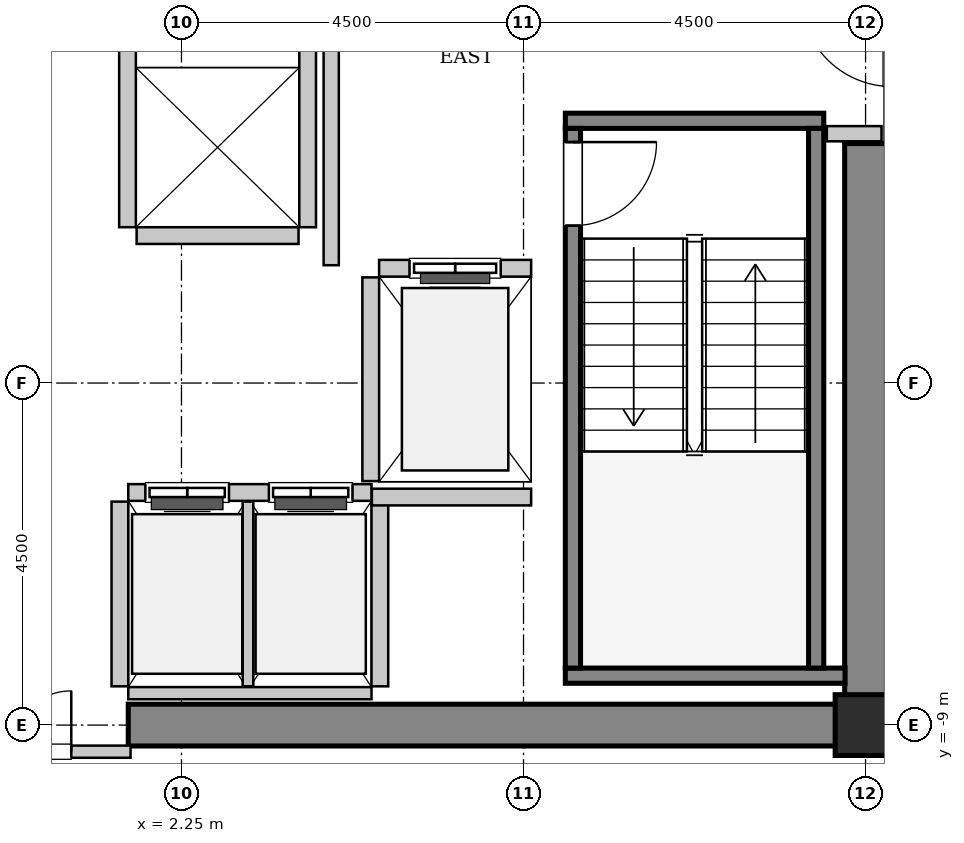
"""IFC4 building model, lengths in metres.
Left out: names, types, materials, properties, quantities, classifications, styles, units other than length and angle.
Written with IfcOpenShell. Run it as: python <this file> out.ifc"""

import sys

from ifc_helpers import new_model, si_unit, direction, frame, frame_2d, origin, origin_2d, place, context, subcontext, project, spatial, rectangle, hollow_rectangle, extrude, source, transform, mapped, element, fill, save


model = new_model("IFC4")
c1 = context("Model", 3, precision=1e-05, world=origin(), true_north=direction((0.0, 1.0)))
c2 = subcontext(c1, "Body", "Model", "MODEL_VIEW")
j1 = project(units=[si_unit("LENGTHUNIT", "METRE"), si_unit("PLANEANGLEUNIT", "RADIAN")], contexts=[c1])
p1 = place(None, origin())
s1 = spatial("IfcSite", under=j1, at=p1, CompositionType="ELEMENT")
p2 = place(p1, origin())
s2 = spatial("IfcBuilding", under=s1, at=p2, CompositionType="ELEMENT")
p3 = place(p2, frame((0.0, 0.0, 186.8)))
s3 = spatial("IfcBuildingStorey", under=s2, at=p3, CompositionType="ELEMENT", Elevation=186.8)
m1 = source(origin(), c2, "Body", "SweptSolid", [
    extrude(rectangle(XDim=9.975, YDim=0.55, at=frame_2d((4.987, 0.0))), origin(), (0.0, 0.0, 1.0), 3.8),
])
p4 = place(p3, frame((1.55, -9.0, 0.0), z_axis=(0.0, 0.0, 1.0), x_axis=(1.0, 0.0, 0.0)))
e1 = element("IfcWall", 1, at=p4, inside=s3, PredefinedType="SHEAR", context=c2, shape_type="MappedRepresentation", body=[
    mapped(m1, transform((0.0, 0.0, 0.0), x_axis=(1.0, 0.0, 0.0), y_axis=(0.0, 1.0, 0.0), z_axis=(0.0, 0.0, 1.0), scale=1.0)),
])
m2 = source(origin(), c2, "Body", "SweptSolid", [
    extrude(rectangle(XDim=7.375, YDim=0.55, at=frame_2d((3.688, 0.0))), origin(), (0.0, 0.0, 1.0), 3.8),
])
p5 = place(p3, frame((11.25, -8.725, 0.0), z_axis=(0.0, 0.0, 1.0), x_axis=(0.0, 1.0, 0.0)))
e2 = element("IfcWall", 2, at=p5, inside=s3, PredefinedType="SHEAR", context=c2, shape_type="MappedRepresentation", body=[
    mapped(m2, transform((0.0, 0.0, 0.0), x_axis=(1.0, 0.0, 0.0), y_axis=(0.0, 1.0, 0.0), z_axis=(0.0, 0.0, 1.0), scale=1.0)),
])
m3 = source(origin(), c2, "Body", "SweptSolid", [
    extrude(hollow_rectangle(XDim=0.8, YDim=0.8, WallThickness=0.04, InnerFilletRadius=0.04, OuterFilletRadius=0.08, at=origin_2d()), origin(), (0.0, 0.0, 1.0), 3.8),
])
p6 = place(p3, frame((11.25, -9.0, 0.0), z_axis=(0.0, 0.0, 1.0), x_axis=(1.0, 0.0, 0.0)))
e3 = element("IfcColumn", 3, at=p6, inside=s3, PredefinedType="COLUMN", context=c2, shape_type="MappedRepresentation", body=[
    mapped(m3, transform((0.0, 0.0, 0.0), x_axis=(1.0, 0.0, 0.0), y_axis=(0.0, 1.0, 0.0), z_axis=(0.0, 0.0, 1.0), scale=1.0)),
])
m4 = source(origin(), c2, "Body", "SweptSolid", [
    extrude(rectangle(XDim=3.4, YDim=0.2, at=frame_2d((1.7, 0.0))), origin(), (0.0, 0.0, 1.0), 3.8),
])
p7 = place(p3, frame((7.3, -1.05, 0.0), z_axis=(0.0, 0.0, 1.0), x_axis=(1.0, 0.0, 0.0)))
e4 = element("IfcWall", 4, at=p7, inside=s3, PredefinedType="SOLIDWALL", context=c2, shape_type="MappedRepresentation", body=[
    mapped(m4, transform((0.0, 0.0, 0.0), x_axis=(1.0, 0.0, 0.0), y_axis=(0.0, 1.0, 0.0), z_axis=(0.0, 0.0, 1.0), scale=1.0)),
])
m5 = source(origin(), c2, "Body", "SweptSolid", [
    extrude(rectangle(XDim=3.68, YDim=0.2, at=frame_2d((1.84, 0.0))), origin(), (0.0, 0.0, 1.0), 3.8),
])
p8 = place(p3, frame((7.3, -8.35, 0.0), z_axis=(0.0, 0.0, 1.0), x_axis=(1.0, 0.0, 0.0)))
e5 = element("IfcWall", 5, at=p8, inside=s3, PredefinedType="SOLIDWALL", context=c2, shape_type="MappedRepresentation", body=[
    mapped(m5, transform((0.0, 0.0, 0.0), x_axis=(1.0, 0.0, 0.0), y_axis=(0.0, 1.0, 0.0), z_axis=(0.0, 0.0, 1.0), scale=1.0)),
])
m6 = source(origin(), c2, "Body", "SweptSolid", [
    extrude(rectangle(XDim=7.1, YDim=0.2, at=frame_2d((3.55, 0.0))), origin(), (0.0, 0.0, 1.0), 3.8),
])
p9 = place(p3, frame((7.4, -1.15, 0.0), z_axis=(0.0, 0.0, 1.0), x_axis=(0.0, -1.0, 0.0)))
e6 = element("IfcWall", 6, at=p9, inside=s3, PredefinedType="SOLIDWALL", context=c2, shape_type="MappedRepresentation", body=[
    mapped(m6, transform((0.0, 0.0, 0.0), x_axis=(1.0, 0.0, 0.0), y_axis=(0.0, 1.0, 0.0), z_axis=(0.0, 0.0, 1.0), scale=1.0)),
])
p10 = place(p9, frame((0.18, 0.0, 0.0)))
e7 = element("IfcOpeningElement", 7, at=p10, cuts=e6, PredefinedType="OPENING", context=c2, shape_type="SweptSolid", body=[
    extrude(rectangle(XDim=1.1, YDim=2.15, at=frame_2d((0.55, 1.075))), frame((0.0, 0.11, 0.0), z_axis=(0.0, -1.0, 0.0), x_axis=(1.0, 0.0, 0.0)), (0.0, 0.0, 1.0), 0.22),
])
p11 = place(p3, frame((10.6, -1.15, 0.0), z_axis=(0.0, 0.0, 1.0), x_axis=(0.0, -1.0, 0.0)))
e8 = element("IfcWall", 8, at=p11, inside=s3, PredefinedType="SOLIDWALL", context=c2, shape_type="MappedRepresentation", body=[
    mapped(m6, transform((0.0, 0.0, 0.0), x_axis=(1.0, 0.0, 0.0), y_axis=(0.0, 1.0, 0.0), z_axis=(0.0, 0.0, 1.0), scale=1.0)),
])
m7 = source(origin(), c2, "Body", "SweptSolid", [
    extrude(rectangle(XDim=2.0, YDim=0.22, at=frame_2d((1.0, 0.0))), origin(), (0.0, 0.0, 1.0), 3.535),
])
p12 = place(p3, frame((6.85, -2.99, 0.0), z_axis=(0.0, 0.0, 1.0), x_axis=(-1.0, 0.0, 0.0)))
e9 = element("IfcWall", 9, at=p12, inside=s3, PredefinedType="SOLIDWALL", context=c2, shape_type="MappedRepresentation", body=[
    mapped(m7, transform((0.0, 0.0, 0.0), x_axis=(1.0, 0.0, 0.0), y_axis=(0.0, 1.0, 0.0), z_axis=(0.0, 0.0, 1.0), scale=1.0)),
])
p13 = place(p12, frame((0.4, 0.0, 0.0)))
e10 = element("IfcOpeningElement", 10, at=p13, cuts=e9, PredefinedType="OPENING", context=c2, shape_type="SweptSolid", body=[
    extrude(rectangle(XDim=1.2, YDim=2.2, at=frame_2d((0.6, 1.1))), frame((0.0, 0.12, 0.0), z_axis=(0.0, -1.0, 0.0), x_axis=(1.0, 0.0, 0.0)), (0.0, 0.0, 1.0), 0.24),
])
m8 = source(origin(), c2, "Body", "SweptSolid", [
    extrude(rectangle(XDim=2.68, YDim=0.22, at=frame_2d((1.34, 0.0))), origin(), (0.0, 0.0, 1.0), 3.535),
])
p14 = place(p3, frame((4.74, -3.11, 0.0), z_axis=(0.0, 0.0, 1.0), x_axis=(0.0, -1.0, 0.0)))
e11 = element("IfcWall", 11, at=p14, inside=s3, PredefinedType="SOLIDWALL", context=c2, shape_type="MappedRepresentation", body=[
    mapped(m8, transform((0.0, 0.0, 0.0), x_axis=(1.0, 0.0, 0.0), y_axis=(0.0, 1.0, 0.0), z_axis=(0.0, 0.0, 1.0), scale=1.0)),
])
m9 = source(origin(), c2, "Body", "SweptSolid", [
    extrude(rectangle(XDim=3.2, YDim=0.22, at=frame_2d((1.6, 0.0))), origin(), (0.0, 0.0, 1.0), 3.535),
])
p15 = place(p3, frame((4.75, -5.94, 0.0), z_axis=(0.0, 0.0, 1.0), x_axis=(-1.0, 0.0, 0.0)))
e12 = element("IfcWall", 12, at=p15, inside=s3, PredefinedType="SOLIDWALL", context=c2, shape_type="MappedRepresentation", body=[
    mapped(m9, transform((0.0, 0.0, 0.0), x_axis=(1.0, 0.0, 0.0), y_axis=(0.0, 1.0, 0.0), z_axis=(0.0, 0.0, 1.0), scale=1.0)),
])
p16 = place(p15, frame((1.875, 0.0, 0.0)))
e13 = element("IfcOpeningElement", 13, at=p16, cuts=e12, PredefinedType="OPENING", context=c2, shape_type="SweptSolid", body=[
    extrude(rectangle(XDim=1.1, YDim=2.2, at=frame_2d((0.55, 1.1))), frame((0.0, 0.12, 0.0), z_axis=(0.0, -1.0, 0.0), x_axis=(1.0, 0.0, 0.0)), (0.0, 0.0, 1.0), 0.24),
])
p17 = place(p15, frame((0.25, 0.0, 0.0)))
e14 = element("IfcOpeningElement", 14, at=p17, cuts=e12, PredefinedType="OPENING", context=c2, shape_type="SweptSolid", body=[
    extrude(rectangle(XDim=1.1, YDim=2.2, at=frame_2d((0.55, 1.1))), frame((0.0, 0.12, 0.0), z_axis=(0.0, -1.0, 0.0), x_axis=(1.0, 0.0, 0.0)), (0.0, 0.0, 1.0), 0.24),
])
m10 = source(origin(), c2, "Body", "SweptSolid", [
    extrude(rectangle(XDim=3.2, YDim=0.16, at=frame_2d((1.6, 0.0))), origin(), (0.0, 0.0, 1.0), 2.425),
])
p18 = place(p3, frame((1.55, -8.58, 0.0), z_axis=(0.0, 0.0, 1.0), x_axis=(1.0, 0.0, 0.0)))
e15 = element("IfcWall", 15, at=p18, inside=s3, PredefinedType="PARTITIONING", context=c2, shape_type="MappedRepresentation", body=[
    mapped(m10, transform((0.0, 0.0, 0.0), x_axis=(1.0, 0.0, 0.0), y_axis=(0.0, 1.0, 0.0), z_axis=(0.0, 0.0, 1.0), scale=1.0)),
])
m11 = source(origin(), c2, "Body", "SweptSolid", [
    extrude(rectangle(XDim=2.43, YDim=0.22, at=frame_2d((1.215, 0.0))), origin(), (0.0, 0.0, 1.0), 3.535),
])
p19 = place(p3, frame((1.44, -6.06, 0.0), z_axis=(0.0, 0.0, 1.0), x_axis=(0.0, -1.0, 0.0)))
e16 = element("IfcWall", 16, at=p19, inside=s3, PredefinedType="SOLIDWALL", context=c2, shape_type="MappedRepresentation", body=[
    mapped(m11, transform((0.0, 0.0, 0.0), x_axis=(1.0, 0.0, 0.0), y_axis=(0.0, 1.0, 0.0), z_axis=(0.0, 0.0, 1.0), scale=1.0)),
])
m12 = source(origin(), c2, "Body", "SweptSolid", [
    extrude(rectangle(XDim=2.43, YDim=0.14, at=frame_2d((1.215, 0.0))), origin(), (0.0, 0.0, 1.0), 3.535),
])
p20 = place(p3, frame((3.125, -8.49, 0.0), z_axis=(0.0, 0.0, 1.0), x_axis=(0.0, 1.0, 0.0)))
e17 = element("IfcWall", 17, at=p20, inside=s3, PredefinedType="PARTITIONING", context=c2, shape_type="MappedRepresentation", body=[
    mapped(m12, transform((0.0, 0.0, 0.0), x_axis=(1.0, 0.0, 0.0), y_axis=(0.0, 1.0, 0.0), z_axis=(0.0, 0.0, 1.0), scale=1.0)),
])
p21 = place(p3, frame((4.86, -8.49, 0.0), z_axis=(0.0, 0.0, 1.0), x_axis=(0.0, 1.0, 0.0)))
e18 = element("IfcWall", 18, at=p21, inside=s3, PredefinedType="SOLIDWALL", context=c2, shape_type="MappedRepresentation", body=[
    mapped(m11, transform((0.0, 0.0, 0.0), x_axis=(1.0, 0.0, 0.0), y_axis=(0.0, 1.0, 0.0), z_axis=(0.0, 0.0, 1.0), scale=1.0)),
])
m13 = source(origin(), c2, "Body", "SweptSolid", [
    extrude(rectangle(XDim=4.9, YDim=0.22, at=frame_2d((2.45, 0.0))), origin(), (0.0, 0.0, 1.0), 3.535),
])
for number, where, z_axis, x_axis in (
    (19, (1.54, 2.45, 0.0), (0.0, 0.0, 1.0), (0.0, -1.0, 0.0)),
    (20, (3.91, -2.45, 0.0), (0.0, 0.0, 1.0), (0.0, 1.0, 0.0)),
):
    element("IfcWall", number, at=place(p3, frame(where, z_axis=z_axis, x_axis=x_axis)), inside=s3, PredefinedType="SOLIDWALL", context=c2, shape_type="MappedRepresentation", body=[
        mapped(m13, transform((0.0, 0.0, 0.0), x_axis=(1.0, 0.0, 0.0), y_axis=(0.0, 1.0, 0.0), z_axis=(0.0, 0.0, 1.0), scale=1.0)),
    ])
m14 = source(origin(), c2, "Body", "SweptSolid", [
    extrude(rectangle(XDim=2.13, YDim=0.22, at=frame_2d((1.065, 0.0))), origin(), (0.0, 0.0, 1.0), 3.535),
])
p22 = place(p3, frame((1.66, -2.56, 0.0), z_axis=(0.0, 0.0, 1.0), x_axis=(1.0, 0.0, 0.0)))
e21 = element("IfcWall", 21, at=p22, inside=s3, PredefinedType="SOLIDWALL", context=c2, shape_type="MappedRepresentation", body=[
    mapped(m14, transform((0.0, 0.0, 0.0), x_axis=(1.0, 0.0, 0.0), y_axis=(0.0, 1.0, 0.0), z_axis=(0.0, 0.0, 1.0), scale=1.0)),
])
m15 = source(origin(), c2, "Body", "SweptSolid", [
    extrude(rectangle(XDim=2.095, YDim=0.22, at=frame_2d((1.048, 0.0))), origin(), (0.0, 0.0, 1.0), 3.535),
])
p23 = place(p3, frame((4.755, -6.0, 0.0), z_axis=(0.0, 0.0, 1.0), x_axis=(1.0, 0.0, 0.0)))
e22 = element("IfcWall", 22, at=p23, inside=s3, PredefinedType="SOLIDWALL", context=c2, shape_type="MappedRepresentation", body=[
    mapped(m15, transform((0.0, 0.0, 0.0), x_axis=(1.0, 0.0, 0.0), y_axis=(0.0, 1.0, 0.0), z_axis=(0.0, 0.0, 1.0), scale=1.0)),
])
m16 = source(origin(), c2, "Body", "SweptSolid", [
    extrude(rectangle(XDim=5.9, YDim=0.2, at=frame_2d((2.95, 0.0))), origin(), (0.0, 0.0, 1.0), 3.535),
])
p24 = place(p3, frame((4.22, -2.95, 0.0), z_axis=(0.0, 0.0, 1.0), x_axis=(0.0, 1.0, 0.0)))
e23 = element("IfcWall", 23, at=p24, inside=s3, PredefinedType="PARTITIONING", context=c2, shape_type="MappedRepresentation", body=[
    mapped(m16, transform((0.0, 0.0, 0.0), x_axis=(1.0, 0.0, 0.0), y_axis=(0.0, 1.0, 0.0), z_axis=(0.0, 0.0, 1.0), scale=1.0)),
])
m17 = source(origin(), c2, "Body", "SweptSolid", [
    extrude(rectangle(XDim=0.72, YDim=0.2, at=frame_2d((0.36, 0.0))), origin(), (0.0, 0.0, 1.0), 3.535),
])
p25 = place(p3, frame((10.74, -1.22, 0.0), z_axis=(0.0, 0.0, 1.0), x_axis=(1.0, 0.0, 0.0)))
e24 = element("IfcWall", 24, at=p25, inside=s3, PredefinedType="PARTITIONING", context=c2, shape_type="MappedRepresentation", body=[
    mapped(m17, transform((0.0, 0.0, 0.0), x_axis=(1.0, 0.0, 0.0), y_axis=(0.0, 1.0, 0.0), z_axis=(0.0, 0.0, 1.0), scale=1.0)),
])
m18 = source(origin(), c2, "Body", "SweptSolid", [
    extrude(rectangle(XDim=3.16, YDim=0.16, at=frame_2d((1.58, 0.0))), origin(), (0.0, 0.0, 1.0), 2.425),
])
p26 = place(p3, frame((-1.58, -9.35, 0.0), z_axis=(0.0, 0.0, 1.0), x_axis=(1.0, 0.0, 0.0)))
e25 = element("IfcWall", 25, at=p26, inside=s3, PredefinedType="PARTITIONING", context=c2, shape_type="MappedRepresentation", body=[
    mapped(m18, transform((0.0, 0.0, 0.0), x_axis=(1.0, 0.0, 0.0), y_axis=(0.0, 1.0, 0.0), z_axis=(0.0, 0.0, 1.0), scale=1.0)),
])
p27 = place(p26, frame((0.78, 0.0, 0.0)))
e26 = element("IfcOpeningElement", 26, at=p27, cuts=e25, PredefinedType="OPENING", context=c2, shape_type="SweptSolid", body=[
    extrude(rectangle(XDim=1.6, YDim=2.3, at=frame_2d((0.8, 1.15))), frame((0.0, 0.09, 0.0), z_axis=(0.0, -1.0, 0.0), x_axis=(1.0, 0.0, 0.0)), (0.0, 0.0, 1.0), 0.18),
])
m19 = source(origin(), c2, "Body", "SweptSolid", [
    extrude(rectangle(XDim=1.1, YDim=2.15, at=frame_2d((0.55, 1.075))), frame((0.0, 0.025, 0.0), z_axis=(0.0, -1.0, 0.0), x_axis=(1.0, 0.0, 0.0)), (0.0, 0.0, 1.0), 0.05),
])
p28 = place(p10, origin())
e27 = element("IfcDoor", 27, at=p28, inside=s3, OperationType="SINGLE_SWING_LEFT", PredefinedType="DOOR", context=c2, shape_type="MappedRepresentation", body=[
    mapped(m19, transform((0.0, 0.0, 0.0), x_axis=(1.0, 0.0, 0.0), y_axis=(0.0, 1.0, 0.0), z_axis=(0.0, 0.0, 1.0), scale=1.0)),
])
fill(e7, e27)
m20 = source(origin(), c2, "Body", "SweptSolid", [
    extrude(rectangle(XDim=1.2, YDim=2.2, at=frame_2d((0.6, 1.1))), frame((0.0, 0.025, 0.0), z_axis=(0.0, -1.0, 0.0), x_axis=(1.0, 0.0, 0.0)), (0.0, 0.0, 1.0), 0.05),
])
p29 = place(p13, origin())
e28 = element("IfcDoor", 28, at=p29, inside=s3, OperationType="SLIDING_TO_LEFT", PredefinedType="DOOR", context=c2, shape_type="MappedRepresentation", body=[
    mapped(m20, transform((0.0, 0.0, 0.0), x_axis=(1.0, 0.0, 0.0), y_axis=(0.0, 1.0, 0.0), z_axis=(0.0, 0.0, 1.0), scale=1.0)),
])
fill(e10, e28)
m21 = source(origin(), c2, "Body", "SweptSolid", [
    extrude(rectangle(XDim=1.1, YDim=2.2, at=frame_2d((0.55, 1.1))), frame((0.0, 0.025, 0.0), z_axis=(0.0, -1.0, 0.0), x_axis=(1.0, 0.0, 0.0)), (0.0, 0.0, 1.0), 0.05),
])
p30 = place(p16, origin())
e29 = element("IfcDoor", 29, at=p30, inside=s3, OperationType="DOUBLE_DOOR_SLIDING", PredefinedType="DOOR", context=c2, shape_type="MappedRepresentation", body=[
    mapped(m21, transform((0.0, 0.0, 0.0), x_axis=(1.0, 0.0, 0.0), y_axis=(0.0, 1.0, 0.0), z_axis=(0.0, 0.0, 1.0), scale=1.0)),
])
fill(e13, e29)
p31 = place(p17, origin())
e30 = element("IfcDoor", 30, at=p31, inside=s3, OperationType="DOUBLE_DOOR_SLIDING", PredefinedType="DOOR", context=c2, shape_type="MappedRepresentation", body=[
    mapped(m21, transform((0.0, 0.0, 0.0), x_axis=(1.0, 0.0, 0.0), y_axis=(0.0, 1.0, 0.0), z_axis=(0.0, 0.0, 1.0), scale=1.0)),
])
fill(e14, e30)
m22 = source(origin(), c2, "Body", "SweptSolid", [
    extrude(rectangle(XDim=1.6, YDim=2.3, at=frame_2d((0.8, 1.15))), frame((0.0, 0.025, 0.0), z_axis=(0.0, -1.0, 0.0), x_axis=(1.0, 0.0, 0.0)), (0.0, 0.0, 1.0), 0.05),
])
p32 = place(p27, origin())
e31 = element("IfcDoor", 31, at=p32, inside=s3, OperationType="DOUBLE_DOOR_SINGLE_SWING", PredefinedType="DOOR", context=c2, shape_type="MappedRepresentation", body=[
    mapped(m22, transform((0.0, 0.0, 0.0), x_axis=(1.0, 0.0, 0.0), y_axis=(0.0, 1.0, 0.0), z_axis=(0.0, 0.0, 1.0), scale=1.0)),
])
fill(e26, e31)
save(model, sys.argv[1])
